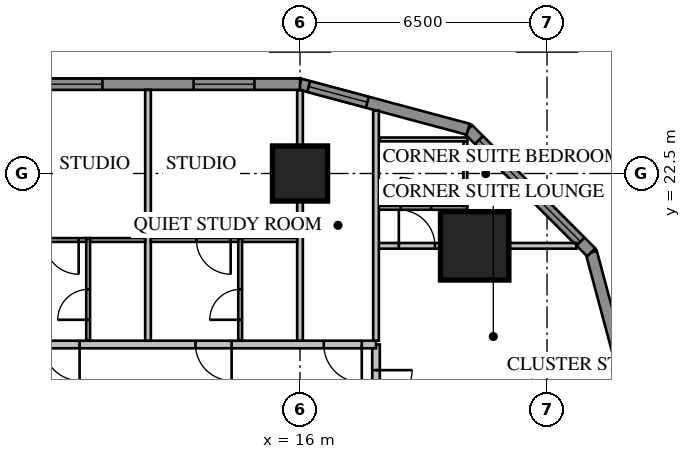
"""IFC4 building model, lengths in metres.
Left out: names, types, materials, properties, quantities, classifications, styles, units other than length and angle.
Written with IfcOpenShell. Run it as: python <this file> out.ifc"""

import sys

from ifc_helpers import new_model, si_unit, direction, frame, frame_2d, origin, origin_2d, place, context, subcontext, project, spatial, rectangle, extrude, element, fill, save


model = new_model("IFC4")
c1 = context("Model", 3, precision=1e-05, world=origin(), true_north=direction((0.0, 1.0)))
c2 = subcontext(c1, "Body", "Model", "MODEL_VIEW")
j1 = project(units=[si_unit("LENGTHUNIT", "METRE"), si_unit("PLANEANGLEUNIT", "RADIAN")], contexts=[c1])
p1 = place(None, origin())
s1 = spatial("IfcSite", under=j1, at=p1, CompositionType="ELEMENT")
p2 = place(p1, origin())
s2 = spatial("IfcBuilding", under=s1, at=p2, CompositionType="ELEMENT")
p3 = place(p2, frame((0.0, 0.0, 19.85)))
s3 = spatial("IfcBuildingStorey", under=s2, at=p3, CompositionType="ELEMENT", Elevation=19.85)
p4 = place(p3, frame((20.596, 20.596, 0.0), z_axis=(0.0, 0.0, 1.0), x_axis=(1.0, 0.0, 0.0)))
e1 = element("IfcColumn", 1, at=p4, inside=s3, PredefinedType="COLUMN", context=c2, shape_type="SweptSolid", body=[
    extrude(rectangle(XDim=1.8, YDim=1.8, at=origin_2d()), origin(), (0.0, 0.0, 1.0), 3.85),
])
p5 = place(p3, frame((16.0, 22.5, 0.0), z_axis=(0.0, 0.0, 1.0), x_axis=(1.0, 0.0, 0.0)))
e2 = element("IfcColumn", 2, at=p5, inside=s3, PredefinedType="COLUMN", context=c2, shape_type="SweptSolid", body=[
    extrude(rectangle(XDim=1.45, YDim=1.45, at=origin_2d()), origin(), (0.0, 0.0, 1.0), 3.85),
])
p6 = place(p3, frame((24.85, 16.0, 0.0), z_axis=(0.0, 0.0, 1.0), x_axis=(-0.258839972501, 0.965920218567, 0.0)))
e3 = element("IfcWall", 3, at=p6, inside=s3, PredefinedType="SOLIDWALL", context=c2, shape_type="SweptSolid", body=[
    extrude(rectangle(XDim=4.581, YDim=0.3, at=frame_2d((2.291, 0.0))), origin(), (0.0, 0.0, 1.0), 3.65),
])
p7 = place(p3, frame((23.664, 20.425, 0.0), z_axis=(0.0, 0.0, 1.0), x_axis=(-0.707106781187, 0.707106781187, 0.0)))
e4 = element("IfcWall", 4, at=p7, inside=s3, PredefinedType="SOLIDWALL", context=c2, shape_type="SweptSolid", body=[
    extrude(rectangle(XDim=4.581, YDim=0.3, at=frame_2d((2.291, 0.0))), origin(), (0.0, 0.0, 1.0), 3.65),
])
p8 = place(p7, frame((0.4, 0.0, 0.75)))
e5 = element("IfcOpeningElement", 5, at=p8, cuts=e4, PredefinedType="OPENING", context=c2, shape_type="SweptSolid", body=[
    extrude(rectangle(XDim=3.781, YDim=1.8, at=frame_2d((1.891, 0.9))), frame((0.0, 0.17, 0.0), z_axis=(0.0, -1.0, 0.0), x_axis=(1.0, 0.0, 0.0)), (0.0, 0.0, 1.0), 0.34),
])
p9 = place(p3, frame((20.425, 23.664, 0.0), z_axis=(0.0, 0.0, 1.0), x_axis=(-0.965920218567, 0.258839972501, 0.0)))
e6 = element("IfcWall", 6, at=p9, inside=s3, PredefinedType="SOLIDWALL", context=c2, shape_type="SweptSolid", body=[
    extrude(rectangle(XDim=4.581, YDim=0.3, at=frame_2d((2.291, 0.0))), origin(), (0.0, 0.0, 1.0), 3.65),
])
p10 = place(p9, frame((2.746, 0.0, 0.75)))
e7 = element("IfcOpeningElement", 7, at=p10, cuts=e6, PredefinedType="OPENING", context=c2, shape_type="SweptSolid", body=[
    extrude(rectangle(XDim=1.6, YDim=1.8, at=frame_2d((0.8, 0.9))), frame((0.0, 0.17, 0.0), z_axis=(0.0, -1.0, 0.0), x_axis=(1.0, 0.0, 0.0)), (0.0, 0.0, 1.0), 0.34),
])
p11 = place(p3, frame((16.0, 24.85, 0.0), z_axis=(0.0, 0.0, 1.0), x_axis=(-1.0, 0.0, 0.0)))
e8 = element("IfcWall", 8, at=p11, inside=s3, PredefinedType="SOLIDWALL", context=c2, shape_type="SweptSolid", body=[
    extrude(rectangle(XDim=32.0, YDim=0.3, at=frame_2d((16.0, 0.0))), origin(), (0.0, 0.0, 1.0), 3.65),
])
p12 = place(p11, frame((1.2, 0.0, 0.75)))
e9 = element("IfcOpeningElement", 9, at=p12, cuts=e8, PredefinedType="OPENING", context=c2, shape_type="SweptSolid", body=[
    extrude(rectangle(XDim=1.6, YDim=1.8, at=frame_2d((0.8, 0.9))), frame((0.0, 0.17, 0.0), z_axis=(0.0, -1.0, 0.0), x_axis=(1.0, 0.0, 0.0)), (0.0, 0.0, 1.0), 0.34),
])
p13 = place(p11, frame((5.2, 0.0, 0.75)))
e10 = element("IfcOpeningElement", 10, at=p13, cuts=e8, PredefinedType="OPENING", context=c2, shape_type="SweptSolid", body=[
    extrude(rectangle(XDim=1.6, YDim=1.8, at=frame_2d((0.8, 0.9))), frame((0.0, 0.17, 0.0), z_axis=(0.0, -1.0, 0.0), x_axis=(1.0, 0.0, 0.0)), (0.0, 0.0, 1.0), 0.34),
])
p14 = place(p11, frame((17.2, 0.0, 0.75)))
e11 = element("IfcOpeningElement", 11, at=p14, cuts=e8, PredefinedType="OPENING", context=c2, shape_type="SweptSolid", body=[
    extrude(rectangle(XDim=1.6, YDim=1.8, at=frame_2d((0.8, 0.9))), frame((0.0, 0.17, 0.0), z_axis=(0.0, -1.0, 0.0), x_axis=(1.0, 0.0, 0.0)), (0.0, 0.0, 1.0), 0.34),
])
p15 = place(p11, frame((21.2, 0.0, 0.75)))
e12 = element("IfcOpeningElement", 12, at=p15, cuts=e8, PredefinedType="OPENING", context=c2, shape_type="SweptSolid", body=[
    extrude(rectangle(XDim=1.6, YDim=1.8, at=frame_2d((0.8, 0.9))), frame((0.0, 0.17, 0.0), z_axis=(0.0, -1.0, 0.0), x_axis=(1.0, 0.0, 0.0)), (0.0, 0.0, 1.0), 0.34),
])
p16 = place(p11, frame((25.2, 0.0, 0.75)))
e13 = element("IfcOpeningElement", 13, at=p16, cuts=e8, PredefinedType="OPENING", context=c2, shape_type="SweptSolid", body=[
    extrude(rectangle(XDim=1.6, YDim=1.8, at=frame_2d((0.8, 0.9))), frame((0.0, 0.17, 0.0), z_axis=(0.0, -1.0, 0.0), x_axis=(1.0, 0.0, 0.0)), (0.0, 0.0, 1.0), 0.34),
])
p17 = place(p11, frame((29.2, 0.0, 0.75)))
e14 = element("IfcOpeningElement", 14, at=p17, cuts=e8, PredefinedType="OPENING", context=c2, shape_type="SweptSolid", body=[
    extrude(rectangle(XDim=1.6, YDim=1.8, at=frame_2d((0.8, 0.9))), frame((0.0, 0.17, 0.0), z_axis=(0.0, -1.0, 0.0), x_axis=(1.0, 0.0, 0.0)), (0.0, 0.0, 1.0), 0.34),
])
p18 = place(p11, frame((8.8, 0.0, 0.75)))
e15 = element("IfcOpeningElement", 15, at=p18, cuts=e8, PredefinedType="OPENING", context=c2, shape_type="SweptSolid", body=[
    extrude(rectangle(XDim=2.4, YDim=1.8, at=frame_2d((1.2, 0.9))), frame((0.0, 0.17, 0.0), z_axis=(0.0, -1.0, 0.0), x_axis=(1.0, 0.0, 0.0)), (0.0, 0.0, 1.0), 0.34),
])
p19 = place(p11, frame((13.812, 0.0, 0.0)))
e16 = element("IfcOpeningElement", 16, at=p19, cuts=e8, PredefinedType="OPENING", context=c2, shape_type="SweptSolid", body=[
    extrude(rectangle(XDim=1.0, YDim=2.4, at=frame_2d((0.5, 1.2))), frame((0.0, 0.17, 0.0), z_axis=(0.0, -1.0, 0.0), x_axis=(1.0, 0.0, 0.0)), (0.0, 0.0, 1.0), 0.34),
])
p20 = place(p3, frame((18.0, -18.0, 0.0), z_axis=(0.0, 0.0, 1.0), x_axis=(0.0, 1.0, 0.0)))
e17 = element("IfcWall", 17, at=p20, inside=s3, PredefinedType="PARTITIONING", context=c2, shape_type="SweptSolid", body=[
    extrude(rectangle(XDim=36.0, YDim=0.2, at=frame_2d((18.0, 0.0))), origin(), (0.0, 0.0, 1.0), 3.65),
])
p21 = place(p20, frame((10.4, 0.0, 0.0)))
e18 = element("IfcOpeningElement", 18, at=p21, cuts=e17, PredefinedType="OPENING", context=c2, shape_type="SweptSolid", body=[
    extrude(rectangle(XDim=1.0, YDim=2.1, at=frame_2d((0.5, 1.05))), frame((0.0, 0.12, 0.0), z_axis=(0.0, -1.0, 0.0), x_axis=(1.0, 0.0, 0.0)), (0.0, 0.0, 1.0), 0.24),
])
p22 = place(p20, frame((0.375, 0.0, 0.0)))
e19 = element("IfcOpeningElement", 19, at=p22, cuts=e17, PredefinedType="OPENING", context=c2, shape_type="SweptSolid", body=[
    extrude(rectangle(XDim=1.0, YDim=2.1, at=frame_2d((0.5, 1.05))), frame((0.0, 0.12, 0.0), z_axis=(0.0, -1.0, 0.0), x_axis=(1.0, 0.0, 0.0)), (0.0, 0.0, 1.0), 0.24),
])
p23 = place(p20, frame((34.375, 0.0, 0.0)))
e20 = element("IfcOpeningElement", 20, at=p23, cuts=e17, PredefinedType="OPENING", context=c2, shape_type="SweptSolid", body=[
    extrude(rectangle(XDim=0.95, YDim=2.1, at=frame_2d((0.475, 1.05))), frame((0.0, 0.12, 0.0), z_axis=(0.0, -1.0, 0.0), x_axis=(1.0, 0.0, 0.0)), (0.0, 0.0, 1.0), 0.24),
])
p24 = place(p3, frame((18.065, 21.596, 0.0), z_axis=(0.0, 0.0, 1.0), x_axis=(1.0, 0.0, 0.0)))
e21 = element("IfcWall", 21, at=p24, inside=s3, PredefinedType="PARTITIONING", context=c2, shape_type="SweptSolid", body=[
    extrude(rectangle(XDim=2.335, YDim=0.1, at=frame_2d((1.167, 0.0))), origin(), (0.0, 0.0, 1.0), 3.65),
])
p25 = place(p24, frame((0.585, 0.0, 0.0)))
e22 = element("IfcOpeningElement", 22, at=p25, cuts=e21, PredefinedType="OPENING", context=c2, shape_type="SweptSolid", body=[
    extrude(rectangle(XDim=0.8, YDim=2.1, at=frame_2d((0.4, 1.05))), frame((0.0, 0.07, 0.0), z_axis=(0.0, -1.0, 0.0), x_axis=(1.0, 0.0, 0.0)), (0.0, 0.0, 1.0), 0.14),
])
p26 = place(p3, frame((20.35, 21.646, 0.0), z_axis=(0.0, 0.0, 1.0), x_axis=(0.0, 1.0, 0.0)))
e23 = element("IfcWall", 23, at=p26, inside=s3, PredefinedType="PARTITIONING", context=c2, shape_type="SweptSolid", body=[
    extrude(rectangle(XDim=1.7, YDim=0.1, at=frame_2d((0.85, 0.0))), origin(), (0.0, 0.0, 1.0), 3.65),
])
p27 = place(p3, frame((18.1, 23.396, 0.0), z_axis=(0.0, 0.0, 1.0), x_axis=(1.0, 0.0, 0.0)))
e24 = element("IfcWall", 24, at=p27, inside=s3, PredefinedType="PARTITIONING", context=c2, shape_type="SweptSolid", body=[
    extrude(rectangle(XDim=2.3, YDim=0.1, at=frame_2d((1.15, 0.0))), origin(), (0.0, 0.0, 1.0), 3.65),
])
p28 = place(p3, frame((18.065, 20.596, 0.0), z_axis=(0.0, 0.0, 1.0), x_axis=(1.0, 0.0, 0.0)))
e25 = element("IfcWall", 25, at=p28, inside=s3, PredefinedType="PARTITIONING", context=c2, shape_type="SweptSolid", body=[
    extrude(rectangle(XDim=5.209, YDim=0.15, at=frame_2d((2.604, 0.0))), origin(), (0.0, 0.0, 1.0), 3.65),
])
p29 = place(p28, frame((0.535, 0.0, 0.0)))
e26 = element("IfcOpeningElement", 26, at=p29, cuts=e25, PredefinedType="OPENING", context=c2, shape_type="SweptSolid", body=[
    extrude(rectangle(XDim=0.95, YDim=2.1, at=frame_2d((0.475, 1.05))), frame((0.0, 0.095, 0.0), z_axis=(0.0, -1.0, 0.0), x_axis=(1.0, 0.0, 0.0)), (0.0, 0.0, 1.0), 0.19),
])
p30 = place(p3, frame((18.0, 18.0, 0.0), z_axis=(0.0, 0.0, 1.0), x_axis=(-1.0, 0.0, 0.0)))
e27 = element("IfcWall", 27, at=p30, inside=s3, PredefinedType="PARTITIONING", context=c2, shape_type="SweptSolid", body=[
    extrude(rectangle(XDim=36.0, YDim=0.2, at=frame_2d((18.0, 0.0))), origin(), (0.0, 0.0, 1.0), 3.65),
])
p31 = place(p30, frame((0.375, 0.0, 0.0)))
e28 = element("IfcOpeningElement", 28, at=p31, cuts=e27, PredefinedType="OPENING", context=c2, shape_type="SweptSolid", body=[
    extrude(rectangle(XDim=1.0, YDim=2.1, at=frame_2d((0.5, 1.05))), frame((0.0, 0.12, 0.0), z_axis=(0.0, -1.0, 0.0), x_axis=(1.0, 0.0, 0.0)), (0.0, 0.0, 1.0), 0.24),
])
p32 = place(p30, frame((3.8, 0.0, 0.0)))
e29 = element("IfcOpeningElement", 29, at=p32, cuts=e27, PredefinedType="OPENING", context=c2, shape_type="SweptSolid", body=[
    extrude(rectangle(XDim=0.95, YDim=2.1, at=frame_2d((0.475, 1.05))), frame((0.0, 0.12, 0.0), z_axis=(0.0, -1.0, 0.0), x_axis=(1.0, 0.0, 0.0)), (0.0, 0.0, 1.0), 0.24),
])
p33 = place(p30, frame((7.8, 0.0, 0.0)))
e30 = element("IfcOpeningElement", 30, at=p33, cuts=e27, PredefinedType="OPENING", context=c2, shape_type="SweptSolid", body=[
    extrude(rectangle(XDim=0.95, YDim=2.1, at=frame_2d((0.475, 1.05))), frame((0.0, 0.12, 0.0), z_axis=(0.0, -1.0, 0.0), x_axis=(1.0, 0.0, 0.0)), (0.0, 0.0, 1.0), 0.24),
])
p34 = place(p30, frame((19.8, 0.0, 0.0)))
e31 = element("IfcOpeningElement", 31, at=p34, cuts=e27, PredefinedType="OPENING", context=c2, shape_type="SweptSolid", body=[
    extrude(rectangle(XDim=0.95, YDim=2.1, at=frame_2d((0.475, 1.05))), frame((0.0, 0.12, 0.0), z_axis=(0.0, -1.0, 0.0), x_axis=(1.0, 0.0, 0.0)), (0.0, 0.0, 1.0), 0.24),
])
p35 = place(p30, frame((23.8, 0.0, 0.0)))
e32 = element("IfcOpeningElement", 32, at=p35, cuts=e27, PredefinedType="OPENING", context=c2, shape_type="SweptSolid", body=[
    extrude(rectangle(XDim=0.95, YDim=2.1, at=frame_2d((0.475, 1.05))), frame((0.0, 0.12, 0.0), z_axis=(0.0, -1.0, 0.0), x_axis=(1.0, 0.0, 0.0)), (0.0, 0.0, 1.0), 0.24),
])
p36 = place(p30, frame((27.8, 0.0, 0.0)))
e33 = element("IfcOpeningElement", 33, at=p36, cuts=e27, PredefinedType="OPENING", context=c2, shape_type="SweptSolid", body=[
    extrude(rectangle(XDim=0.95, YDim=2.1, at=frame_2d((0.475, 1.05))), frame((0.0, 0.12, 0.0), z_axis=(0.0, -1.0, 0.0), x_axis=(1.0, 0.0, 0.0)), (0.0, 0.0, 1.0), 0.24),
])
p37 = place(p30, frame((31.8, 0.0, 0.0)))
e34 = element("IfcOpeningElement", 34, at=p37, cuts=e27, PredefinedType="OPENING", context=c2, shape_type="SweptSolid", body=[
    extrude(rectangle(XDim=0.95, YDim=2.1, at=frame_2d((0.475, 1.05))), frame((0.0, 0.12, 0.0), z_axis=(0.0, -1.0, 0.0), x_axis=(1.0, 0.0, 0.0)), (0.0, 0.0, 1.0), 0.24),
])
p38 = place(p30, frame((34.375, 0.0, 0.0)))
e35 = element("IfcOpeningElement", 35, at=p38, cuts=e27, PredefinedType="OPENING", context=c2, shape_type="SweptSolid", body=[
    extrude(rectangle(XDim=0.95, YDim=2.1, at=frame_2d((0.475, 1.05))), frame((0.0, 0.12, 0.0), z_axis=(0.0, -1.0, 0.0), x_axis=(1.0, 0.0, 0.0)), (0.0, 0.0, 1.0), 0.24),
])
p39 = place(p30, frame((11.2, 0.0, 0.0)))
e36 = element("IfcOpeningElement", 36, at=p39, cuts=e27, PredefinedType="OPENING", context=c2, shape_type="SweptSolid", body=[
    extrude(rectangle(XDim=1.0, YDim=2.1, at=frame_2d((0.5, 1.05))), frame((0.0, 0.12, 0.0), z_axis=(0.0, -1.0, 0.0), x_axis=(1.0, 0.0, 0.0)), (0.0, 0.0, 1.0), 0.24),
])
p40 = place(p3, frame((18.0, 18.1, 0.0), z_axis=(0.0, 0.0, 1.0), x_axis=(0.0, 1.0, 0.0)))
e37 = element("IfcWall", 37, at=p40, inside=s3, PredefinedType="PARTITIONING", context=c2, shape_type="SweptSolid", body=[
    extrude(rectangle(XDim=6.053, YDim=0.15, at=frame_2d((3.027, 0.0))), origin(), (0.0, 0.0, 1.0), 3.65),
])
p41 = place(p3, frame((16.0, 18.1, 0.0), z_axis=(0.0, 0.0, 1.0), x_axis=(0.0, 1.0, 0.0)))
e38 = element("IfcWall", 38, at=p41, inside=s3, PredefinedType="PARTITIONING", context=c2, shape_type="SweptSolid", body=[
    extrude(rectangle(XDim=6.589, YDim=0.15, at=frame_2d((3.295, 0.0))), origin(), (0.0, 0.0, 1.0), 3.65),
])
p42 = place(p3, frame((12.0, 18.1, 0.0), z_axis=(0.0, 0.0, 1.0), x_axis=(0.0, 1.0, 0.0)))
e39 = element("IfcWall", 39, at=p42, inside=s3, PredefinedType="PARTITIONING", context=c2, shape_type="SweptSolid", body=[
    extrude(rectangle(XDim=6.6, YDim=0.15, at=frame_2d((3.3, 0.0))), origin(), (0.0, 0.0, 1.0), 3.65),
])
p43 = place(p3, frame((14.425, 18.1, 0.0), z_axis=(0.0, 0.0, 1.0), x_axis=(0.0, 1.0, 0.0)))
e40 = element("IfcWall", 40, at=p43, inside=s3, PredefinedType="PARTITIONING", context=c2, shape_type="SweptSolid", body=[
    extrude(rectangle(XDim=2.7, YDim=0.1, at=frame_2d((1.35, 0.0))), origin(), (0.0, 0.0, 1.0), 3.65),
])
p44 = place(p43, frame((0.55, 0.0, 0.0)))
e41 = element("IfcOpeningElement", 41, at=p44, cuts=e40, PredefinedType="OPENING", context=c2, shape_type="SweptSolid", body=[
    extrude(rectangle(XDim=0.8, YDim=2.1, at=frame_2d((0.4, 1.05))), frame((0.0, 0.07, 0.0), z_axis=(0.0, -1.0, 0.0), x_axis=(1.0, 0.0, 0.0)), (0.0, 0.0, 1.0), 0.14),
])
p45 = place(p3, frame((15.925, 20.75, 0.0), z_axis=(0.0, 0.0, 1.0), x_axis=(-1.0, 0.0, 0.0)))
e42 = element("IfcWall", 42, at=p45, inside=s3, PredefinedType="PARTITIONING", context=c2, shape_type="SweptSolid", body=[
    extrude(rectangle(XDim=1.45, YDim=0.1, at=frame_2d((0.725, 0.0))), origin(), (0.0, 0.0, 1.0), 3.65),
])
p46 = place(p3, frame((10.425, 18.1, 0.0), z_axis=(0.0, 0.0, 1.0), x_axis=(0.0, 1.0, 0.0)))
e43 = element("IfcWall", 43, at=p46, inside=s3, PredefinedType="PARTITIONING", context=c2, shape_type="SweptSolid", body=[
    extrude(rectangle(XDim=2.7, YDim=0.1, at=frame_2d((1.35, 0.0))), origin(), (0.0, 0.0, 1.0), 3.65),
])
p47 = place(p46, frame((0.55, 0.0, 0.0)))
e44 = element("IfcOpeningElement", 44, at=p47, cuts=e43, PredefinedType="OPENING", context=c2, shape_type="SweptSolid", body=[
    extrude(rectangle(XDim=0.8, YDim=2.1, at=frame_2d((0.4, 1.05))), frame((0.0, 0.07, 0.0), z_axis=(0.0, -1.0, 0.0), x_axis=(1.0, 0.0, 0.0)), (0.0, 0.0, 1.0), 0.14),
])
p48 = place(p3, frame((11.925, 20.75, 0.0), z_axis=(0.0, 0.0, 1.0), x_axis=(-1.0, 0.0, 0.0)))
e45 = element("IfcWall", 45, at=p48, inside=s3, PredefinedType="PARTITIONING", context=c2, shape_type="SweptSolid", body=[
    extrude(rectangle(XDim=1.45, YDim=0.1, at=frame_2d((0.725, 0.0))), origin(), (0.0, 0.0, 1.0), 3.65),
])
p49 = place(p3, frame((14.375, 20.75, 0.0), z_axis=(0.0, 0.0, 1.0), x_axis=(-1.0, 0.0, 0.0)))
e46 = element("IfcWall", 46, at=p49, inside=s3, PredefinedType="PARTITIONING", context=c2, shape_type="SweptSolid", body=[
    extrude(rectangle(XDim=2.3, YDim=0.1, at=frame_2d((1.15, 0.0))), origin(), (0.0, 0.0, 1.0), 3.65),
])
p50 = place(p49, frame((0.2, 0.0, 0.0)))
e47 = element("IfcOpeningElement", 47, at=p50, cuts=e46, PredefinedType="OPENING", context=c2, shape_type="SweptSolid", body=[
    extrude(rectangle(XDim=0.9, YDim=2.1, at=frame_2d((0.45, 1.05))), frame((0.0, 0.07, 0.0), z_axis=(0.0, -1.0, 0.0), x_axis=(1.0, 0.0, 0.0)), (0.0, 0.0, 1.0), 0.14),
])
p51 = place(p3, frame((10.375, 20.75, 0.0), z_axis=(0.0, 0.0, 1.0), x_axis=(-1.0, 0.0, 0.0)))
e48 = element("IfcWall", 48, at=p51, inside=s3, PredefinedType="PARTITIONING", context=c2, shape_type="SweptSolid", body=[
    extrude(rectangle(XDim=2.3, YDim=0.1, at=frame_2d((1.15, 0.0))), origin(), (0.0, 0.0, 1.0), 3.65),
])
p52 = place(p51, frame((0.2, 0.0, 0.0)))
e49 = element("IfcOpeningElement", 49, at=p52, cuts=e48, PredefinedType="OPENING", context=c2, shape_type="SweptSolid", body=[
    extrude(rectangle(XDim=0.9, YDim=2.1, at=frame_2d((0.45, 1.05))), frame((0.0, 0.07, 0.0), z_axis=(0.0, -1.0, 0.0), x_axis=(1.0, 0.0, 0.0)), (0.0, 0.0, 1.0), 0.14),
])
p53 = place(p8, origin())
e50 = element("IfcWindow", 50, at=p53, inside=s3, PartitioningType="SINGLE_PANEL", PredefinedType="WINDOW", context=c2, shape_type="SweptSolid", body=[
    extrude(rectangle(XDim=3.781, YDim=1.8, at=frame_2d((1.891, 0.9))), frame((0.0, 0.03, 0.0), z_axis=(0.0, -1.0, 0.0), x_axis=(1.0, 0.0, 0.0)), (0.0, 0.0, 1.0), 0.06),
])
fill(e5, e50)
p54 = place(p10, origin())
e51 = element("IfcWindow", 51, at=p54, inside=s3, PartitioningType="SINGLE_PANEL", PredefinedType="WINDOW", context=c2, shape_type="SweptSolid", body=[
    extrude(rectangle(XDim=1.6, YDim=1.8, at=frame_2d((0.8, 0.9))), frame((0.0, 0.03, 0.0), z_axis=(0.0, -1.0, 0.0), x_axis=(1.0, 0.0, 0.0)), (0.0, 0.0, 1.0), 0.06),
])
fill(e7, e51)
p55 = place(p12, origin())
e52 = element("IfcWindow", 52, at=p55, inside=s3, PartitioningType="SINGLE_PANEL", PredefinedType="WINDOW", context=c2, shape_type="SweptSolid", body=[
    extrude(rectangle(XDim=1.6, YDim=1.8, at=frame_2d((0.8, 0.9))), frame((0.0, 0.03, 0.0), z_axis=(0.0, -1.0, 0.0), x_axis=(1.0, 0.0, 0.0)), (0.0, 0.0, 1.0), 0.06),
])
fill(e9, e52)
p56 = place(p13, origin())
e53 = element("IfcWindow", 53, at=p56, inside=s3, PartitioningType="SINGLE_PANEL", PredefinedType="WINDOW", context=c2, shape_type="SweptSolid", body=[
    extrude(rectangle(XDim=1.6, YDim=1.8, at=frame_2d((0.8, 0.9))), frame((0.0, 0.03, 0.0), z_axis=(0.0, -1.0, 0.0), x_axis=(1.0, 0.0, 0.0)), (0.0, 0.0, 1.0), 0.06),
])
fill(e10, e53)
p57 = place(p23, origin())
e54 = element("IfcDoor", 54, at=p57, inside=s3, OperationType="SINGLE_SWING_RIGHT", PredefinedType="DOOR", context=c2, shape_type="SweptSolid", body=[
    extrude(rectangle(XDim=0.95, YDim=2.1, at=frame_2d((0.475, 1.05))), frame((0.0, 0.025, 0.0), z_axis=(0.0, -1.0, 0.0), x_axis=(1.0, 0.0, 0.0)), (0.0, 0.0, 1.0), 0.05),
])
fill(e20, e54)
p58 = place(p25, origin())
e55 = element("IfcDoor", 55, at=p58, inside=s3, OperationType="SINGLE_SWING_LEFT", PredefinedType="DOOR", context=c2, shape_type="SweptSolid", body=[
    extrude(rectangle(XDim=0.8, YDim=2.1, at=frame_2d((0.4, 1.05))), frame((0.0, 0.025, 0.0), z_axis=(0.0, -1.0, 0.0), x_axis=(1.0, 0.0, 0.0)), (0.0, 0.0, 1.0), 0.05),
])
fill(e22, e55)
p59 = place(p29, origin())
e56 = element("IfcDoor", 56, at=p59, inside=s3, OperationType="SINGLE_SWING_LEFT", PredefinedType="DOOR", context=c2, shape_type="SweptSolid", body=[
    extrude(rectangle(XDim=0.95, YDim=2.1, at=frame_2d((0.475, 1.05))), frame((0.0, 0.025, 0.0), z_axis=(0.0, -1.0, 0.0), x_axis=(1.0, 0.0, 0.0)), (0.0, 0.0, 1.0), 0.05),
])
fill(e26, e56)
p60 = place(p31, origin())
e57 = element("IfcDoor", 57, at=p60, inside=s3, OperationType="SINGLE_SWING_LEFT", PredefinedType="DOOR", context=c2, shape_type="SweptSolid", body=[
    extrude(rectangle(XDim=1.0, YDim=2.1, at=frame_2d((0.5, 1.05))), frame((0.0, 0.025, 0.0), z_axis=(0.0, -1.0, 0.0), x_axis=(1.0, 0.0, 0.0)), (0.0, 0.0, 1.0), 0.05),
])
fill(e28, e57)
p61 = place(p32, origin())
e58 = element("IfcDoor", 58, at=p61, inside=s3, OperationType="SINGLE_SWING_LEFT", PredefinedType="DOOR", context=c2, shape_type="SweptSolid", body=[
    extrude(rectangle(XDim=0.95, YDim=2.1, at=frame_2d((0.475, 1.05))), frame((0.0, 0.025, 0.0), z_axis=(0.0, -1.0, 0.0), x_axis=(1.0, 0.0, 0.0)), (0.0, 0.0, 1.0), 0.05),
])
fill(e29, e58)
p62 = place(p44, origin())
e59 = element("IfcDoor", 59, at=p62, inside=s3, OperationType="SINGLE_SWING_LEFT", PredefinedType="DOOR", context=c2, shape_type="SweptSolid", body=[
    extrude(rectangle(XDim=0.8, YDim=2.1, at=frame_2d((0.4, 1.05))), frame((0.0, 0.025, 0.0), z_axis=(0.0, -1.0, 0.0), x_axis=(1.0, 0.0, 0.0)), (0.0, 0.0, 1.0), 0.05),
])
fill(e41, e59)
p63 = place(p33, origin())
e60 = element("IfcDoor", 60, at=p63, inside=s3, OperationType="SINGLE_SWING_LEFT", PredefinedType="DOOR", context=c2, shape_type="SweptSolid", body=[
    extrude(rectangle(XDim=0.95, YDim=2.1, at=frame_2d((0.475, 1.05))), frame((0.0, 0.025, 0.0), z_axis=(0.0, -1.0, 0.0), x_axis=(1.0, 0.0, 0.0)), (0.0, 0.0, 1.0), 0.05),
])
fill(e30, e60)
p64 = place(p47, origin())
e61 = element("IfcDoor", 61, at=p64, inside=s3, OperationType="SINGLE_SWING_LEFT", PredefinedType="DOOR", context=c2, shape_type="SweptSolid", body=[
    extrude(rectangle(XDim=0.8, YDim=2.1, at=frame_2d((0.4, 1.05))), frame((0.0, 0.025, 0.0), z_axis=(0.0, -1.0, 0.0), x_axis=(1.0, 0.0, 0.0)), (0.0, 0.0, 1.0), 0.05),
])
fill(e44, e61)
p65 = place(p50, origin())
e62 = element("IfcDoor", 62, at=p65, inside=s3, OperationType="SINGLE_SWING_LEFT", PredefinedType="DOOR", context=c2, shape_type="SweptSolid", body=[
    extrude(rectangle(XDim=0.9, YDim=2.1, at=frame_2d((0.45, 1.05))), frame((0.0, 0.025, 0.0), z_axis=(0.0, -1.0, 0.0), x_axis=(1.0, 0.0, 0.0)), (0.0, 0.0, 1.0), 0.05),
])
fill(e47, e62)
p66 = place(p52, origin())
e63 = element("IfcDoor", 63, at=p66, inside=s3, OperationType="SINGLE_SWING_LEFT", PredefinedType="DOOR", context=c2, shape_type="SweptSolid", body=[
    extrude(rectangle(XDim=0.9, YDim=2.1, at=frame_2d((0.45, 1.05))), frame((0.0, 0.025, 0.0), z_axis=(0.0, -1.0, 0.0), x_axis=(1.0, 0.0, 0.0)), (0.0, 0.0, 1.0), 0.05),
])
fill(e49, e63)
save(model, sys.argv[1])
